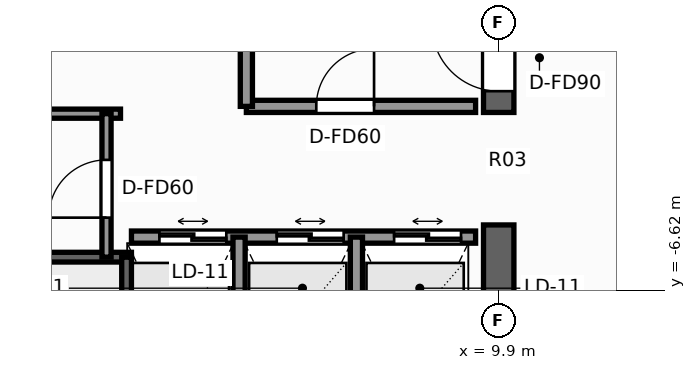
"""IFC4 building model, lengths in metres.
Left out: names, types, materials, properties, quantities, classifications, styles, units other than length and angle.
Written with IfcOpenShell. Run it as: python <this file> out.ifc"""

import sys

from ifc_helpers import new_model, si_unit, direction, frame, frame_2d, origin, place, context, subcontext, project, spatial, rectangle, extrude, element, fill, save


model = new_model("IFC4")
c1 = context("Model", 3, precision=1e-05, world=origin(), true_north=direction((0.0, 1.0)))
c2 = subcontext(c1, "Body", "Model", "MODEL_VIEW")
j1 = project(units=[si_unit("LENGTHUNIT", "METRE"), si_unit("PLANEANGLEUNIT", "RADIAN")], contexts=[c1])
p1 = place(None, origin())
s1 = spatial("IfcSite", under=j1, at=p1, CompositionType="ELEMENT")
p2 = place(p1, origin())
s2 = spatial("IfcBuilding", under=s1, at=p2, CompositionType="ELEMENT")
p3 = place(p2, frame((0.0, 0.0, 173.4)))
s3 = spatial("IfcBuildingStorey", under=s2, at=p3, CompositionType="ELEMENT", Elevation=173.4)
p4 = place(p3, frame((9.9, -9.65, 0.0), z_axis=(0.0, 0.0, 1.0), x_axis=(0.0, 1.0, 0.0)))
e1 = element("IfcWall", 1, at=p4, inside=s3, PredefinedType="SHEAR", context=c2, shape_type="SweptSolid", body=[
    extrude(rectangle(XDim=4.1, YDim=0.5, at=frame_2d((2.05, 0.0))), origin(), (0.0, 0.0, 1.0), 3.3),
])
p5 = place(p3, frame((9.9, -3.7, 0.0), z_axis=(0.0, 0.0, 1.0), x_axis=(0.0, 1.0, 0.0)))
e2 = element("IfcWall", 2, at=p5, inside=s3, PredefinedType="SHEAR", context=c2, shape_type="SweptSolid", body=[
    extrude(rectangle(XDim=13.35, YDim=0.5, at=frame_2d((6.675, 0.0))), origin(), (0.0, 0.0, 1.0), 3.3),
])
p6 = place(p5, frame((0.35, 0.0, 0.0)))
e3 = element("IfcOpeningElement", 3, at=p6, cuts=e2, PredefinedType="OPENING", context=c2, shape_type="SweptSolid", body=[
    extrude(rectangle(XDim=1.1, YDim=2.2, at=frame_2d((0.55, 1.1))), frame((0.0, 0.26, 0.0), z_axis=(0.0, -1.0, 0.0), x_axis=(1.0, 0.0, 0.0)), (0.0, 0.0, 1.0), 0.52),
])
p7 = place(p3, frame((-3.86, -6.08, 0.0), z_axis=(0.0, 0.0, 1.0), x_axis=(1.0, 0.0, 0.0)))
e4 = element("IfcWall", 4, at=p7, inside=s3, PredefinedType="SHEAR", context=c2, shape_type="SweptSolid", body=[
    extrude(rectangle(XDim=7.72, YDim=0.16, at=frame_2d((3.86, 0.0))), origin(), (0.0, 0.0, 1.0), 3.3),
])
p8 = place(p3, frame((3.78, -9.43, 0.0), z_axis=(0.0, 0.0, 1.0), x_axis=(0.0, 1.0, 0.0)))
e5 = element("IfcWall", 5, at=p8, inside=s3, PredefinedType="SHEAR", context=c2, shape_type="SweptSolid", body=[
    extrude(rectangle(XDim=3.35, YDim=0.16, at=frame_2d((1.675, 0.0))), origin(), (0.0, 0.0, 1.0), 3.3),
])
p9 = place(p3, frame((5.75, -3.6, 0.0), z_axis=(0.0, 0.0, 1.0), x_axis=(1.0, 0.0, 0.0)))
e6 = element("IfcWall", 6, at=p9, inside=s3, PredefinedType="SOLIDWALL", context=c2, shape_type="SweptSolid", body=[
    extrude(rectangle(XDim=3.77, YDim=0.2, at=frame_2d((1.885, 0.0))), origin(), (0.0, 0.0, 1.0), 3.08),
])
p10 = place(p9, frame((1.15, 0.0, 0.0)))
e7 = element("IfcOpeningElement", 7, at=p10, cuts=e6, PredefinedType="OPENING", context=c2, shape_type="SweptSolid", body=[
    extrude(rectangle(XDim=0.95, YDim=2.06, at=frame_2d((0.475, 1.03))), frame((0.0, 0.11, 0.0), z_axis=(0.0, -1.0, 0.0), x_axis=(1.0, 0.0, 0.0)), (0.0, 0.0, 1.0), 0.22),
])
p11 = place(p3, frame((5.75, -3.6, 0.0), z_axis=(0.0, 0.0, 1.0), x_axis=(0.0, 1.0, 0.0)))
e8 = element("IfcWall", 8, at=p11, inside=s3, PredefinedType="SOLIDWALL", context=c2, shape_type="SweptSolid", body=[
    extrude(rectangle(XDim=5.57, YDim=0.2, at=frame_2d((2.785, 0.0))), origin(), (0.0, 0.0, 1.0), 2.715),
])
p12 = place(p11, frame((2.75, 0.0, 0.0)))
e9 = element("IfcOpeningElement", 9, at=p12, cuts=e8, PredefinedType="OPENING", context=c2, shape_type="SweptSolid", body=[
    extrude(rectangle(XDim=1.1, YDim=2.2, at=frame_2d((0.55, 1.1))), frame((0.0, 0.11, 0.0), z_axis=(0.0, -1.0, 0.0), x_axis=(1.0, 0.0, 0.0)), (0.0, 0.0, 1.0), 0.22),
])
p13 = place(p3, frame((3.86, -5.75, 0.0), z_axis=(0.0, 0.0, 1.0), x_axis=(1.0, 0.0, 0.0)))
e10 = element("IfcWall", 10, at=p13, inside=s3, PredefinedType="SOLIDWALL", context=c2, shape_type="SweptSolid", body=[
    extrude(rectangle(XDim=5.66, YDim=0.2, at=frame_2d((2.83, 0.0))), origin(), (0.0, 0.0, 1.0), 3.08),
])
p14 = place(p13, frame((0.46, 0.0, 0.0)))
e11 = element("IfcOpeningElement", 11, at=p14, cuts=e10, PredefinedType="OPENING", context=c2, shape_type="SweptSolid", body=[
    extrude(rectangle(XDim=1.1, YDim=2.2, at=frame_2d((0.55, 1.1))), frame((0.0, 0.11, 0.0), z_axis=(0.0, -1.0, 0.0), x_axis=(1.0, 0.0, 0.0)), (0.0, 0.0, 1.0), 0.22),
])
p15 = place(p13, frame((2.39, 0.0, 0.0)))
e12 = element("IfcOpeningElement", 12, at=p15, cuts=e10, PredefinedType="OPENING", context=c2, shape_type="SweptSolid", body=[
    extrude(rectangle(XDim=1.1, YDim=2.2, at=frame_2d((0.55, 1.1))), frame((0.0, 0.11, 0.0), z_axis=(0.0, -1.0, 0.0), x_axis=(1.0, 0.0, 0.0)), (0.0, 0.0, 1.0), 0.22),
])
p16 = place(p13, frame((4.32, 0.0, 0.0)))
e13 = element("IfcOpeningElement", 13, at=p16, cuts=e10, PredefinedType="OPENING", context=c2, shape_type="SweptSolid", body=[
    extrude(rectangle(XDim=1.1, YDim=2.2, at=frame_2d((0.55, 1.1))), frame((0.0, 0.11, 0.0), z_axis=(0.0, -1.0, 0.0), x_axis=(1.0, 0.0, 0.0)), (0.0, 0.0, 1.0), 0.22),
])
for number, where, z_axis, x_axis in (
    (14, (5.63, -9.52, 0.0), (0.0, 0.0, 1.0), (0.0, 1.0, 0.0)),
    (15, (7.56, -9.52, 0.0), (0.0, 0.0, 1.0), (0.0, 1.0, 0.0)),
):
    element("IfcWall", number, at=place(p3, frame(where, z_axis=z_axis, x_axis=x_axis)), inside=s3, PredefinedType="SOLIDWALL", context=c2, shape_type="SweptSolid", body=[
        extrude(rectangle(XDim=3.77, YDim=0.2, at=frame_2d((1.885, 0.0))), origin(), (0.0, 0.0, 1.0), 3.08),
    ])
p17 = place(p3, frame((-3.68, -3.72, 0.0), z_axis=(0.0, 0.0, 1.0), x_axis=(1.0, 0.0, 0.0)))
e16 = element("IfcWall", 16, at=p17, inside=s3, PredefinedType="PARTITIONING", context=c2, shape_type="SweptSolid", body=[
    extrude(rectangle(XDim=7.36, YDim=0.15, at=frame_2d((3.68, 0.0))), origin(), (0.0, 0.0, 1.0), 3.08),
])
p18 = place(p3, frame((3.45, -6.08, 0.0), z_axis=(0.0, 0.0, 1.0), x_axis=(0.0, 1.0, 0.0)))
e17 = element("IfcWall", 17, at=p18, inside=s3, PredefinedType="PARTITIONING", context=c2, shape_type="SweptSolid", body=[
    extrude(rectangle(XDim=2.36, YDim=0.15, at=frame_2d((1.18, 0.0))), origin(), (0.0, 0.0, 1.0), 3.08),
])
p19 = place(p18, frame((0.65, 0.0, 0.0)))
e18 = element("IfcOpeningElement", 18, at=p19, cuts=e17, PredefinedType="OPENING", context=c2, shape_type="SweptSolid", body=[
    extrude(rectangle(XDim=0.95, YDim=2.06, at=frame_2d((0.475, 1.03))), frame((0.0, 0.085, 0.0), z_axis=(0.0, -1.0, 0.0), x_axis=(1.0, 0.0, 0.0)), (0.0, 0.0, 1.0), 0.17),
])
p20 = place(p6, origin())
e19 = element("IfcDoor", 19, at=p20, inside=s3, OperationType="SINGLE_SWING_RIGHT", PredefinedType="DOOR", context=c2, shape_type="SweptSolid", body=[
    extrude(rectangle(XDim=1.1, YDim=2.2, at=frame_2d((0.55, 1.1))), frame((0.0, 0.025, 0.0), z_axis=(0.0, -1.0, 0.0), x_axis=(1.0, 0.0, 0.0)), (0.0, 0.0, 1.0), 0.05),
])
fill(e3, e19)
p21 = place(p14, origin())
e20 = element("IfcDoor", 20, at=p21, inside=s3, OperationType="DOUBLE_DOOR_SLIDING", PredefinedType="DOOR", context=c2, shape_type="SweptSolid", body=[
    extrude(rectangle(XDim=1.1, YDim=2.2, at=frame_2d((0.55, 1.1))), frame((0.0, 0.025, 0.0), z_axis=(0.0, -1.0, 0.0), x_axis=(1.0, 0.0, 0.0)), (0.0, 0.0, 1.0), 0.05),
])
fill(e11, e20)
p22 = place(p15, origin())
e21 = element("IfcDoor", 21, at=p22, inside=s3, OperationType="DOUBLE_DOOR_SLIDING", PredefinedType="DOOR", context=c2, shape_type="SweptSolid", body=[
    extrude(rectangle(XDim=1.1, YDim=2.2, at=frame_2d((0.55, 1.1))), frame((0.0, 0.025, 0.0), z_axis=(0.0, -1.0, 0.0), x_axis=(1.0, 0.0, 0.0)), (0.0, 0.0, 1.0), 0.05),
])
fill(e12, e21)
p23 = place(p16, origin())
e22 = element("IfcDoor", 22, at=p23, inside=s3, OperationType="DOUBLE_DOOR_SLIDING", PredefinedType="DOOR", context=c2, shape_type="SweptSolid", body=[
    extrude(rectangle(XDim=1.1, YDim=2.2, at=frame_2d((0.55, 1.1))), frame((0.0, 0.025, 0.0), z_axis=(0.0, -1.0, 0.0), x_axis=(1.0, 0.0, 0.0)), (0.0, 0.0, 1.0), 0.05),
])
fill(e13, e22)
p24 = place(p10, origin())
e23 = element("IfcDoor", 23, at=p24, inside=s3, OperationType="SINGLE_SWING_RIGHT", PredefinedType="DOOR", context=c2, shape_type="SweptSolid", body=[
    extrude(rectangle(XDim=0.95, YDim=2.06, at=frame_2d((0.475, 1.03))), frame((0.0, 0.025, 0.0), z_axis=(0.0, -1.0, 0.0), x_axis=(1.0, 0.0, 0.0)), (0.0, 0.0, 1.0), 0.05),
])
fill(e7, e23)
p25 = place(p19, origin())
e24 = element("IfcDoor", 24, at=p25, inside=s3, OperationType="SINGLE_SWING_LEFT", PredefinedType="DOOR", context=c2, shape_type="SweptSolid", body=[
    extrude(rectangle(XDim=0.95, YDim=2.06, at=frame_2d((0.475, 1.03))), frame((0.0, 0.025, 0.0), z_axis=(0.0, -1.0, 0.0), x_axis=(1.0, 0.0, 0.0)), (0.0, 0.0, 1.0), 0.05),
])
fill(e18, e24)
save(model, sys.argv[1])
